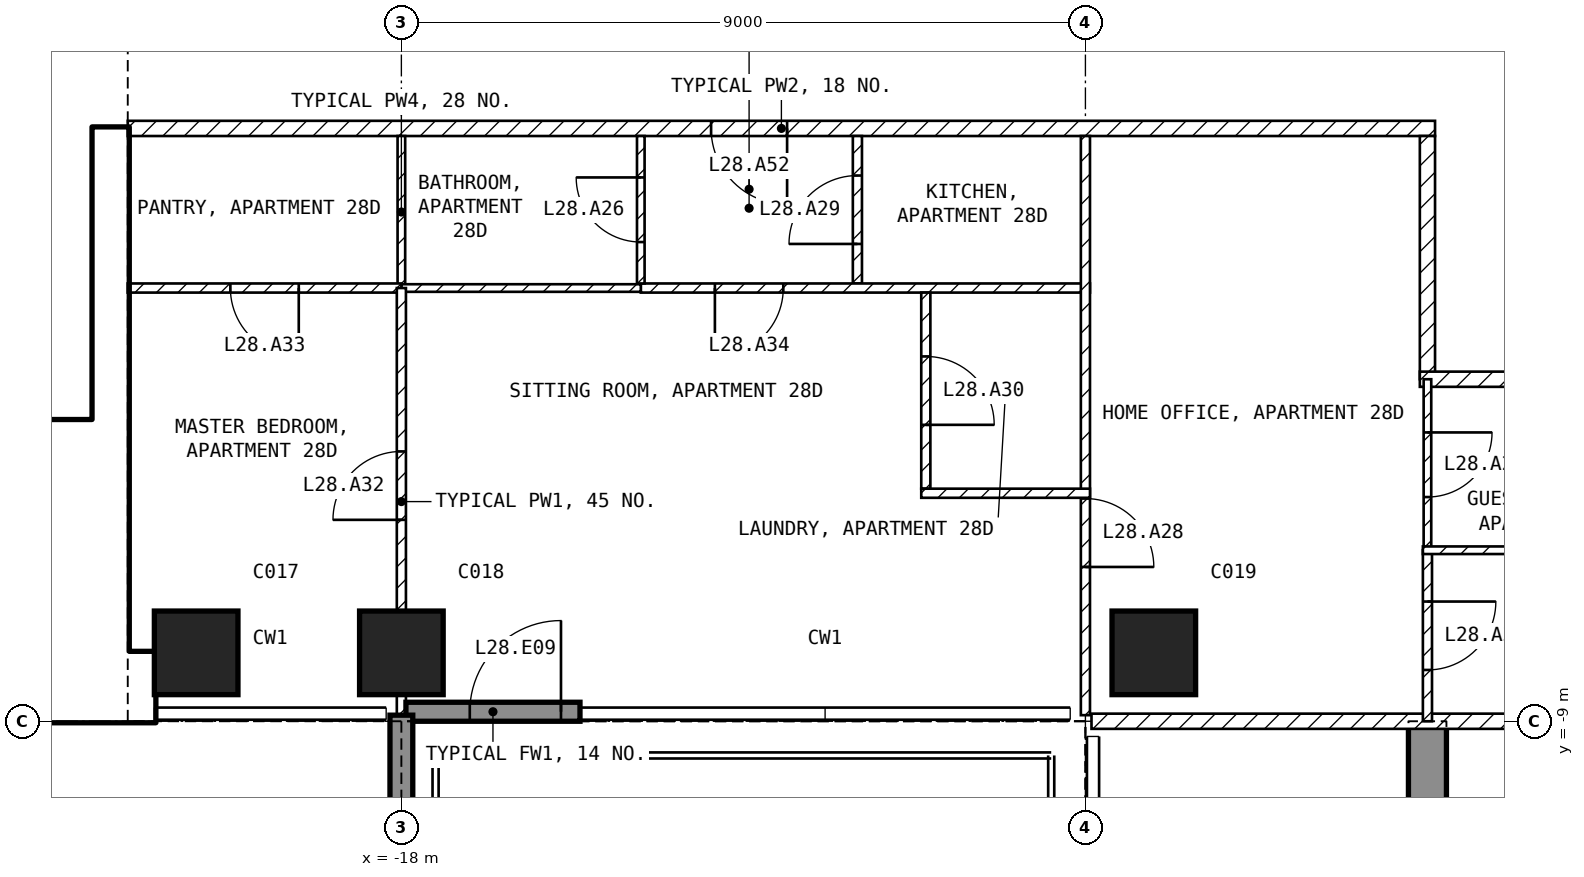
"""IFC4 building model, lengths in metres.
Left out: names, types, materials, properties, quantities, classifications, styles, units other than length and angle.
Written with IfcOpenShell. Run it as: python <this file> out.ifc"""

import sys

from ifc_helpers import new_model, si_unit, direction, frame, frame_2d, origin, origin_2d, place, context, subcontext, project, spatial, polyline, rectangle, outline, extrude, element, fill, save


model = new_model("IFC4")
c1 = context("Model", 3, precision=1e-05, world=origin(), true_north=direction((0.0, 1.0)))
c2 = subcontext(c1, "Body", "Model", "MODEL_VIEW")
j1 = project(units=[si_unit("LENGTHUNIT", "METRE"), si_unit("PLANEANGLEUNIT", "RADIAN")], contexts=[c1])
p1 = place(None, origin())
s1 = spatial("IfcSite", under=j1, at=p1, CompositionType="ELEMENT")
p2 = place(p1, origin())
s2 = spatial("IfcBuilding", under=s1, at=p2, CompositionType="ELEMENT")
p3 = place(p2, frame((0.0, 0.0, 119.9)))
s3 = spatial("IfcBuildingStorey", under=s2, at=p3, CompositionType="ELEMENT", Elevation=119.9)
for number, where, z_axis, x_axis in (
    (1, (-20.7, -8.1, -0.25), (0.0, 0.0, 1.0), (1.0, 0.0, 0.0)),
    (2, (-18.0, -8.1, -0.25), (0.0, 0.0, 1.0), (1.0, 0.0, 0.0)),
    (3, (-8.1, -8.1, -0.25), (0.0, 0.0, 1.0), (1.0, 0.0, 0.0)),
):
    element("IfcColumn", number, at=place(p3, frame(where, z_axis=z_axis, x_axis=x_axis)), inside=s3, PredefinedType="COLUMN", context=c2, shape_type="SweptSolid", body=[
        extrude(rectangle(XDim=1.1, YDim=1.1, at=origin_2d()), origin(), (0.0, 0.0, 1.0), 3.5),
    ])
p4 = place(p3, frame((-4.75, -20.15, -0.25), z_axis=(1.0, 0.0, 0.0), x_axis=(0.0, 1.0, 0.0)))
e4 = element("IfcWall", 4, at=p4, inside=s3, PredefinedType="SHEAR", context=c2, shape_type="SweptSolid", body=[
    extrude(outline(polyline([(0.0, 0.0), (6.65, 0.0), (6.65, 2.65), (9.05, 2.65), (9.05, 0.0), (11.15, 0.0), (11.15, 3.5), (0.0, 3.5), (0.0, 0.0)])), origin(), (0.0, 0.0, 1.0), 0.5),
])
p5 = place(p3, frame((-17.94, -8.875, 0.0), z_axis=(0.0, 0.0, 1.0), x_axis=(1.0, 0.0, 0.0)))
e5 = element("IfcWall", 5, at=p5, inside=s3, PredefinedType="SOLIDWALL", context=c2, shape_type="SweptSolid", body=[
    extrude(rectangle(XDim=2.29, YDim=0.25, at=frame_2d((1.145, 0.0))), origin(), (0.0, 0.0, 1.0), 3.25),
])
p6 = place(p5, frame((0.84, 0.0, 0.0)))
e6 = element("IfcOpeningElement", 6, at=p6, cuts=e5, PredefinedType="OPENING", context=c2, shape_type="SweptSolid", body=[
    extrude(rectangle(XDim=1.2, YDim=2.4, at=frame_2d((0.6, 1.2))), frame((0.0, 0.135, 0.0), z_axis=(0.0, -1.0, 0.0), x_axis=(1.0, 0.0, 0.0)), (0.0, 0.0, 1.0), 0.27),
])
p7 = place(p3, frame((-18.0, -8.92, 0.0), z_axis=(0.0, 0.0, 1.0), x_axis=(0.0, -1.0, 0.0)))
e7 = element("IfcWall", 7, at=p7, inside=s3, PredefinedType="SOLIDWALL", context=c2, shape_type="SweptSolid", body=[
    extrude(rectangle(XDim=2.82, YDim=0.3, at=frame_2d((1.41, 0.0))), origin(), (0.0, 0.0, 1.0), 3.25),
])
p8 = place(p3, frame((-30.2, -8.55, 0.0), z_axis=(0.0, 0.0, 1.0), x_axis=(1.0, 0.0, 0.0)))
e8 = element("IfcWall", 8, at=p8, inside=s3, PredefinedType="SHEAR", context=c2, shape_type="SweptSolid", body=[
    extrude(rectangle(XDim=8.95, YDim=0.9, at=frame_2d((4.475, 0.0))), origin(), (0.0, 0.0, 1.0), 3.25),
])
p9 = place(p3, frame((-21.825, -8.1, 0.0), z_axis=(0.0, 0.0, 1.0), x_axis=(0.0, 1.0, 0.0)))
e9 = element("IfcWall", 9, at=p9, inside=s3, PredefinedType="SHEAR", context=c2, shape_type="SweptSolid", body=[
    extrude(rectangle(XDim=6.9, YDim=0.45, at=frame_2d((3.45, 0.0))), origin(), (0.0, 0.0, 1.0), 3.25),
])
p10 = place(p3, frame((-28.35, -5.15, 0.0), z_axis=(0.0, 0.0, 1.0), x_axis=(1.0, 0.0, 0.0)))
e10 = element("IfcWall", 10, at=p10, inside=s3, PredefinedType="SOLIDWALL", context=c2, shape_type="SweptSolid", body=[
    extrude(rectangle(XDim=6.3, YDim=0.2, at=frame_2d((3.15, 0.0))), origin(), (0.0, 0.0, 1.0), 3.25),
])
p11 = place(p10, frame((5.1, 0.0, 0.0)))
e11 = element("IfcOpeningElement", 11, at=p11, cuts=e10, PredefinedType="OPENING", context=c2, shape_type="SweptSolid", body=[
    extrude(rectangle(XDim=1.0, YDim=2.1, at=frame_2d((0.5, 1.05))), frame((0.0, 0.11, 0.0), z_axis=(0.0, -1.0, 0.0), x_axis=(1.0, 0.0, 0.0)), (0.0, 0.0, 1.0), 0.22),
])
p12 = place(p3, frame((-4.4, -1.2, 0.0), z_axis=(0.0, 0.0, 1.0), x_axis=(-1.0, 0.0, 0.0)))
e12 = element("IfcWall", 12, at=p12, inside=s3, PredefinedType="PARTITIONING", context=c2, shape_type="SweptSolid", body=[
    extrude(rectangle(XDim=17.2, YDim=0.2, at=frame_2d((8.6, 0.0))), origin(), (0.0, 0.0, 1.0), 3.25),
])
p13 = place(p12, frame((8.525, 0.0, 0.0)))
e13 = element("IfcOpeningElement", 13, at=p13, cuts=e12, PredefinedType="OPENING", context=c2, shape_type="SweptSolid", body=[
    extrude(rectangle(XDim=1.0, YDim=2.1, at=frame_2d((0.5, 1.05))), frame((0.0, 0.11, 0.0), z_axis=(0.0, -1.0, 0.0), x_axis=(1.0, 0.0, 0.0)), (0.0, 0.0, 1.0), 0.22),
])
p14 = place(p3, frame((-4.5, -4.5, 0.0), z_axis=(0.0, 0.0, 1.0), x_axis=(0.0, 1.0, 0.0)))
e14 = element("IfcWall", 14, at=p14, inside=s3, PredefinedType="PARTITIONING", context=c2, shape_type="SweptSolid", body=[
    extrude(rectangle(XDim=3.2, YDim=0.2, at=frame_2d((1.6, 0.0))), origin(), (0.0, 0.0, 1.0), 3.25),
])
p15 = place(p3, frame((-1.1, -4.5, 0.0), z_axis=(0.0, 0.0, 1.0), x_axis=(-1.0, 0.0, 0.0)))
e15 = element("IfcWall", 15, at=p15, inside=s3, PredefinedType="PARTITIONING", context=c2, shape_type="SweptSolid", body=[
    extrude(rectangle(XDim=3.5, YDim=0.2, at=frame_2d((1.75, 0.0))), origin(), (0.0, 0.0, 1.0), 3.25),
])
p16 = place(p3, frame((8.92, -9.0, 0.0), z_axis=(0.0, 0.0, 1.0), x_axis=(-1.0, 0.0, 0.0)))
e16 = element("IfcWall", 16, at=p16, inside=s3, PredefinedType="PARTITIONING", context=c2, shape_type="SweptSolid", body=[
    extrude(rectangle(XDim=17.84, YDim=0.2, at=frame_2d((8.92, 0.0))), origin(), (0.0, 0.0, 1.0), 3.25),
])
p17 = place(p16, frame((8.42, 0.0, 0.0)))
e17 = element("IfcOpeningElement", 17, at=p17, cuts=e16, PredefinedType="OPENING", context=c2, shape_type="SweptSolid", body=[
    extrude(rectangle(XDim=1.0, YDim=2.1, at=frame_2d((0.5, 1.05))), frame((0.0, 0.11, 0.0), z_axis=(0.0, -1.0, 0.0), x_axis=(1.0, 0.0, 0.0)), (0.0, 0.0, 1.0), 0.22),
])
p18 = place(p3, frame((-12.0, -3.24, 0.0), z_axis=(0.0, 0.0, 1.0), x_axis=(0.0, 1.0, 0.0)))
e18 = element("IfcWall", 18, at=p18, inside=s3, PredefinedType="PARTITIONING", context=c2, shape_type="SweptSolid", body=[
    extrude(rectangle(XDim=1.94, YDim=0.12, at=frame_2d((0.97, 0.0))), origin(), (0.0, 0.0, 1.0), 3.25),
])
p19 = place(p18, frame((0.52, 0.0, 0.0)))
e19 = element("IfcOpeningElement", 19, at=p19, cuts=e18, PredefinedType="OPENING", context=c2, shape_type="SweptSolid", body=[
    extrude(rectangle(XDim=0.9, YDim=2.1, at=frame_2d((0.45, 1.05))), frame((0.0, 0.07, 0.0), z_axis=(0.0, -1.0, 0.0), x_axis=(1.0, 0.0, 0.0)), (0.0, 0.0, 1.0), 0.14),
])
p20 = place(p3, frame((-8.94, -3.3, 0.0), z_axis=(0.0, 0.0, 1.0), x_axis=(-1.0, 0.0, 0.0)))
e20 = element("IfcWall", 20, at=p20, inside=s3, PredefinedType="PARTITIONING", context=c2, shape_type="SweptSolid", body=[
    extrude(rectangle(XDim=5.91, YDim=0.12, at=frame_2d((2.955, 0.0))), origin(), (0.0, 0.0, 1.0), 3.25),
])
p21 = place(p20, frame((4.035, 0.0, 0.0)))
e21 = element("IfcOpeningElement", 21, at=p21, cuts=e20, PredefinedType="OPENING", context=c2, shape_type="SweptSolid", body=[
    extrude(rectangle(XDim=0.9, YDim=2.1, at=frame_2d((0.45, 1.05))), frame((0.0, 0.07, 0.0), z_axis=(0.0, -1.0, 0.0), x_axis=(1.0, 0.0, 0.0)), (0.0, 0.0, 1.0), 0.14),
])
p22 = place(p3, frame((-9.0, -1.3, 0.0), z_axis=(0.0, 0.0, 1.0), x_axis=(0.0, -1.0, 0.0)))
e22 = element("IfcWall", 22, at=p22, inside=s3, PredefinedType="PARTITIONING", context=c2, shape_type="SweptSolid", body=[
    extrude(rectangle(XDim=7.62, YDim=0.12, at=frame_2d((3.81, 0.0))), origin(), (0.0, 0.0, 1.0), 3.25),
])
p23 = place(p22, frame((4.77, 0.0, 0.0)))
e23 = element("IfcOpeningElement", 23, at=p23, cuts=e22, PredefinedType="OPENING", context=c2, shape_type="SweptSolid", body=[
    extrude(rectangle(XDim=0.9, YDim=2.1, at=frame_2d((0.45, 1.05))), frame((0.0, 0.07, 0.0), z_axis=(0.0, -1.0, 0.0), x_axis=(1.0, 0.0, 0.0)), (0.0, 0.0, 1.0), 0.14),
])
p24 = place(p3, frame((-14.85, -3.24, 0.0), z_axis=(0.0, 0.0, 1.0), x_axis=(0.0, 1.0, 0.0)))
e24 = element("IfcWall", 24, at=p24, inside=s3, PredefinedType="PARTITIONING", context=c2, shape_type="SweptSolid", body=[
    extrude(rectangle(XDim=1.94, YDim=0.1, at=frame_2d((0.97, 0.0))), origin(), (0.0, 0.0, 1.0), 3.25),
])
p25 = place(p24, frame((0.545, 0.0, 0.0)))
e25 = element("IfcOpeningElement", 25, at=p25, cuts=e24, PredefinedType="OPENING", context=c2, shape_type="SweptSolid", body=[
    extrude(rectangle(XDim=0.85, YDim=2.1, at=frame_2d((0.425, 1.05))), frame((0.0, 0.06, 0.0), z_axis=(0.0, -1.0, 0.0), x_axis=(1.0, 0.0, 0.0)), (0.0, 0.0, 1.0), 0.12),
])
p26 = place(p3, frame((-18.0, -3.3, 0.0), z_axis=(0.0, 0.0, 1.0), x_axis=(0.0, 1.0, 0.0)))
e26 = element("IfcWall", 26, at=p26, inside=s3, PredefinedType="PARTITIONING", context=c2, shape_type="SweptSolid", body=[
    extrude(rectangle(XDim=2.0, YDim=0.1, at=frame_2d((1.0, 0.0))), origin(), (0.0, 0.0, 1.0), 2.414),
])
p27 = place(p3, frame((-14.85, -3.3, 0.0), z_axis=(0.0, 0.0, 1.0), x_axis=(-1.0, 0.0, 0.0)))
e27 = element("IfcWall", 27, at=p27, inside=s3, PredefinedType="PARTITIONING", context=c2, shape_type="SweptSolid", body=[
    extrude(rectangle(XDim=3.15, YDim=0.1, at=frame_2d((1.575, 0.0))), origin(), (0.0, 0.0, 1.0), 3.25),
])
p28 = place(p3, frame((-18.0, -3.3, 0.0), z_axis=(0.0, 0.0, 1.0), x_axis=(-1.0, 0.0, 0.0)))
e28 = element("IfcWall", 28, at=p28, inside=s3, PredefinedType="PARTITIONING", context=c2, shape_type="SweptSolid", body=[
    extrude(rectangle(XDim=3.6, YDim=0.12, at=frame_2d((1.8, 0.0))), origin(), (0.0, 0.0, 1.0), 3.25),
])
p29 = place(p28, frame((1.35, 0.0, 0.0)))
e29 = element("IfcOpeningElement", 29, at=p29, cuts=e28, PredefinedType="OPENING", context=c2, shape_type="SweptSolid", body=[
    extrude(rectangle(XDim=0.9, YDim=2.1, at=frame_2d((0.45, 1.05))), frame((0.0, 0.07, 0.0), z_axis=(0.0, -1.0, 0.0), x_axis=(1.0, 0.0, 0.0)), (0.0, 0.0, 1.0), 0.14),
])
p30 = place(p3, frame((-11.1, -3.36, 0.0), z_axis=(0.0, 0.0, 1.0), x_axis=(0.0, -1.0, 0.0)))
e30 = element("IfcWall", 30, at=p30, inside=s3, PredefinedType="PARTITIONING", context=c2, shape_type="SweptSolid", body=[
    extrude(rectangle(XDim=2.58, YDim=0.12, at=frame_2d((1.29, 0.0))), origin(), (0.0, 0.0, 1.0), 3.25),
])
p31 = place(p30, frame((0.84, 0.0, 0.0)))
e31 = element("IfcOpeningElement", 31, at=p31, cuts=e30, PredefinedType="OPENING", context=c2, shape_type="SweptSolid", body=[
    extrude(rectangle(XDim=0.9, YDim=2.1, at=frame_2d((0.45, 1.05))), frame((0.0, 0.07, 0.0), z_axis=(0.0, -1.0, 0.0), x_axis=(1.0, 0.0, 0.0)), (0.0, 0.0, 1.0), 0.14),
])
p32 = place(p3, frame((-11.16, -6.0, 0.0), z_axis=(0.0, 0.0, 1.0), x_axis=(1.0, 0.0, 0.0)))
e32 = element("IfcWall", 32, at=p32, inside=s3, PredefinedType="PARTITIONING", context=c2, shape_type="SweptSolid", body=[
    extrude(rectangle(XDim=2.22, YDim=0.12, at=frame_2d((1.11, 0.0))), origin(), (0.0, 0.0, 1.0), 3.25),
])
p33 = place(p3, frame((-18.0, -8.92, 0.0), z_axis=(0.0, 0.0, 1.0), x_axis=(0.0, 1.0, 0.0)))
e33 = element("IfcWall", 33, at=p33, inside=s3, PredefinedType="PARTITIONING", context=c2, shape_type="SweptSolid", body=[
    extrude(rectangle(XDim=5.62, YDim=0.12, at=frame_2d((2.81, 0.0))), origin(), (0.0, 0.0, 1.0), 2.414),
])
p34 = place(p33, frame((2.57, 0.0, 0.0)))
e34 = element("IfcOpeningElement", 34, at=p34, cuts=e33, PredefinedType="OPENING", context=c2, shape_type="SweptSolid", body=[
    extrude(rectangle(XDim=0.9, YDim=2.1, at=frame_2d((0.45, 1.05))), frame((0.0, 0.07, 0.0), z_axis=(0.0, -1.0, 0.0), x_axis=(1.0, 0.0, 0.0)), (0.0, 0.0, 1.0), 0.14),
])
p35 = place(p3, frame((-4.5, -4.5, 0.0), z_axis=(0.0, 0.0, 1.0), x_axis=(0.0, -1.0, 0.0)))
e35 = element("IfcWall", 35, at=p35, inside=s3, PredefinedType="PARTITIONING", context=c2, shape_type="SweptSolid", body=[
    extrude(rectangle(XDim=2.25, YDim=0.1, at=frame_2d((1.125, 0.0))), origin(), (0.0, 0.0, 1.0), 3.25),
])
p36 = place(p35, frame((0.7, 0.0, 0.0)))
e36 = element("IfcOpeningElement", 36, at=p36, cuts=e35, PredefinedType="OPENING", context=c2, shape_type="SweptSolid", body=[
    extrude(rectangle(XDim=0.85, YDim=2.1, at=frame_2d((0.425, 1.05))), frame((0.0, 0.06, 0.0), z_axis=(0.0, -1.0, 0.0), x_axis=(1.0, 0.0, 0.0)), (0.0, 0.0, 1.0), 0.12),
])
p37 = place(p3, frame((-4.5, -6.75, 0.0), z_axis=(0.0, 0.0, 1.0), x_axis=(0.0, -1.0, 0.0)))
e37 = element("IfcWall", 37, at=p37, inside=s3, PredefinedType="PARTITIONING", context=c2, shape_type="SweptSolid", body=[
    extrude(rectangle(XDim=2.25, YDim=0.12, at=frame_2d((1.125, 0.0))), origin(), (0.0, 0.0, 1.0), 3.25),
])
p38 = place(p37, frame((0.675, 0.0, 0.0)))
e38 = element("IfcOpeningElement", 38, at=p38, cuts=e37, PredefinedType="OPENING", context=c2, shape_type="SweptSolid", body=[
    extrude(rectangle(XDim=0.9, YDim=2.1, at=frame_2d((0.45, 1.05))), frame((0.0, 0.07, 0.0), z_axis=(0.0, -1.0, 0.0), x_axis=(1.0, 0.0, 0.0)), (0.0, 0.0, 1.0), 0.14),
])
p39 = place(p3, frame((-1.1, -6.75, 0.0), z_axis=(0.0, 0.0, 1.0), x_axis=(-1.0, 0.0, 0.0)))
e39 = element("IfcWall", 39, at=p39, inside=s3, PredefinedType="PARTITIONING", context=c2, shape_type="SweptSolid", body=[
    extrude(rectangle(XDim=3.46, YDim=0.1, at=frame_2d((1.73, 0.0))), origin(), (0.0, 0.0, 1.0), 3.25),
])
p40 = place(p6, origin())
e40 = element("IfcDoor", 40, at=p40, inside=s3, OperationType="SINGLE_SWING_RIGHT", PredefinedType="DOOR", context=c2, shape_type="SweptSolid", body=[
    extrude(rectangle(XDim=1.2, YDim=2.4, at=frame_2d((0.6, 1.2))), frame((0.0, 0.025, 0.0), z_axis=(0.0, -1.0, 0.0), x_axis=(1.0, 0.0, 0.0)), (0.0, 0.0, 1.0), 0.05),
])
fill(e6, e40)
p41 = place(p11, origin())
e41 = element("IfcDoor", 41, at=p41, inside=s3, OperationType="SINGLE_SWING_LEFT", PredefinedType="DOOR", context=c2, shape_type="SweptSolid", body=[
    extrude(rectangle(XDim=1.0, YDim=2.1, at=frame_2d((0.5, 1.05))), frame((0.0, 0.025, 0.0), z_axis=(0.0, -1.0, 0.0), x_axis=(1.0, 0.0, 0.0)), (0.0, 0.0, 1.0), 0.05),
])
fill(e11, e41)
p42 = place(p25, origin())
e42 = element("IfcDoor", 42, at=p42, inside=s3, OperationType="SINGLE_SWING_RIGHT", PredefinedType="DOOR", context=c2, shape_type="SweptSolid", body=[
    extrude(rectangle(XDim=0.85, YDim=2.1, at=frame_2d((0.425, 1.05))), frame((0.0, 0.025, 0.0), z_axis=(0.0, -1.0, 0.0), x_axis=(1.0, 0.0, 0.0)), (0.0, 0.0, 1.0), 0.05),
])
fill(e25, e42)
p43 = place(p36, origin())
e43 = element("IfcDoor", 43, at=p43, inside=s3, OperationType="SINGLE_SWING_LEFT", PredefinedType="DOOR", context=c2, shape_type="SweptSolid", body=[
    extrude(rectangle(XDim=0.85, YDim=2.1, at=frame_2d((0.425, 1.05))), frame((0.0, 0.025, 0.0), z_axis=(0.0, -1.0, 0.0), x_axis=(1.0, 0.0, 0.0)), (0.0, 0.0, 1.0), 0.05),
])
fill(e36, e43)
p44 = place(p23, origin())
e44 = element("IfcDoor", 44, at=p44, inside=s3, OperationType="SINGLE_SWING_RIGHT", PredefinedType="DOOR", context=c2, shape_type="SweptSolid", body=[
    extrude(rectangle(XDim=0.9, YDim=2.1, at=frame_2d((0.45, 1.05))), frame((0.0, 0.025, 0.0), z_axis=(0.0, -1.0, 0.0), x_axis=(1.0, 0.0, 0.0)), (0.0, 0.0, 1.0), 0.05),
])
fill(e23, e44)
p45 = place(p19, origin())
e45 = element("IfcDoor", 45, at=p45, inside=s3, OperationType="SINGLE_SWING_LEFT", PredefinedType="DOOR", context=c2, shape_type="SweptSolid", body=[
    extrude(rectangle(XDim=0.9, YDim=2.1, at=frame_2d((0.45, 1.05))), frame((0.0, 0.025, 0.0), z_axis=(0.0, -1.0, 0.0), x_axis=(1.0, 0.0, 0.0)), (0.0, 0.0, 1.0), 0.05),
])
fill(e19, e45)
p46 = place(p31, origin())
e46 = element("IfcDoor", 46, at=p46, inside=s3, OperationType="SINGLE_SWING_RIGHT", PredefinedType="DOOR", context=c2, shape_type="SweptSolid", body=[
    extrude(rectangle(XDim=0.9, YDim=2.1, at=frame_2d((0.45, 1.05))), frame((0.0, 0.025, 0.0), z_axis=(0.0, -1.0, 0.0), x_axis=(1.0, 0.0, 0.0)), (0.0, 0.0, 1.0), 0.05),
])
fill(e31, e46)
p47 = place(p38, origin())
e47 = element("IfcDoor", 47, at=p47, inside=s3, OperationType="SINGLE_SWING_LEFT", PredefinedType="DOOR", context=c2, shape_type="SweptSolid", body=[
    extrude(rectangle(XDim=0.9, YDim=2.1, at=frame_2d((0.45, 1.05))), frame((0.0, 0.025, 0.0), z_axis=(0.0, -1.0, 0.0), x_axis=(1.0, 0.0, 0.0)), (0.0, 0.0, 1.0), 0.05),
])
fill(e38, e47)
p48 = place(p34, origin())
e48 = element("IfcDoor", 48, at=p48, inside=s3, OperationType="SINGLE_SWING_LEFT", PredefinedType="DOOR", context=c2, shape_type="SweptSolid", body=[
    extrude(rectangle(XDim=0.9, YDim=2.1, at=frame_2d((0.45, 1.05))), frame((0.0, 0.025, 0.0), z_axis=(0.0, -1.0, 0.0), x_axis=(1.0, 0.0, 0.0)), (0.0, 0.0, 1.0), 0.05),
])
fill(e34, e48)
p49 = place(p29, origin())
e49 = element("IfcDoor", 49, at=p49, inside=s3, OperationType="SINGLE_SWING_LEFT", PredefinedType="DOOR", context=c2, shape_type="SweptSolid", body=[
    extrude(rectangle(XDim=0.9, YDim=2.1, at=frame_2d((0.45, 1.05))), frame((0.0, 0.025, 0.0), z_axis=(0.0, -1.0, 0.0), x_axis=(1.0, 0.0, 0.0)), (0.0, 0.0, 1.0), 0.05),
])
fill(e29, e49)
p50 = place(p21, origin())
e50 = element("IfcDoor", 50, at=p50, inside=s3, OperationType="SINGLE_SWING_RIGHT", PredefinedType="DOOR", context=c2, shape_type="SweptSolid", body=[
    extrude(rectangle(XDim=0.9, YDim=2.1, at=frame_2d((0.45, 1.05))), frame((0.0, 0.025, 0.0), z_axis=(0.0, -1.0, 0.0), x_axis=(1.0, 0.0, 0.0)), (0.0, 0.0, 1.0), 0.05),
])
fill(e21, e50)
p51 = place(p13, origin())
e51 = element("IfcDoor", 51, at=p51, inside=s3, OperationType="SINGLE_SWING_LEFT", PredefinedType="DOOR", context=c2, shape_type="SweptSolid", body=[
    extrude(rectangle(XDim=1.0, YDim=2.1, at=frame_2d((0.5, 1.05))), frame((0.0, 0.025, 0.0), z_axis=(0.0, -1.0, 0.0), x_axis=(1.0, 0.0, 0.0)), (0.0, 0.0, 1.0), 0.05),
])
fill(e13, e51)
save(model, sys.argv[1])
